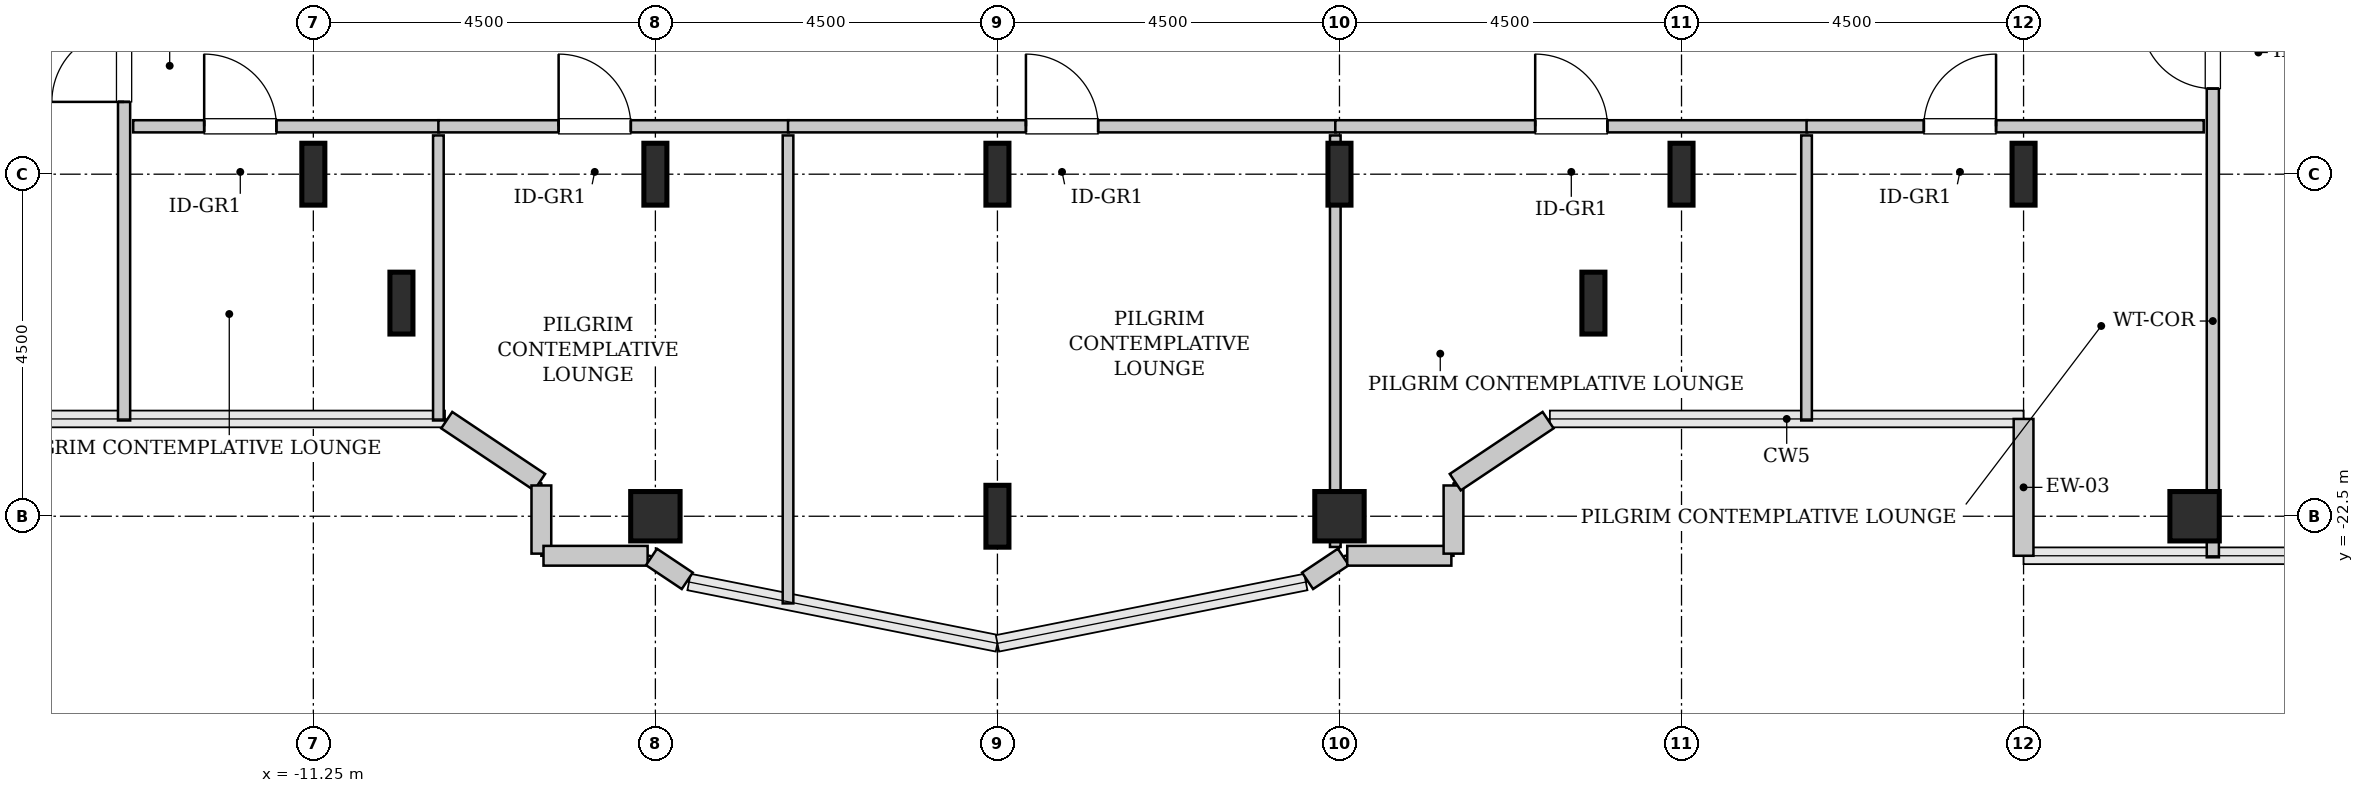
"""IFC4 building model, lengths in metres.
Left out: names, types, materials, properties, quantities, classifications, styles, units other than length and angle.
Written with IfcOpenShell. Run it as: python <this file> out.ifc"""

import sys

from ifc_helpers import new_model, si_unit, direction, frame, frame_2d, origin, origin_2d, place, context, subcontext, project, spatial, rectangle, hollow_rectangle, i_section, extrude, source, transform, mapped, element, fill, save


model = new_model("IFC4")
c1 = context("Model", 3, precision=1e-05, world=origin(), true_north=direction((0.0, 1.0)))
c2 = subcontext(c1, "Body", "Model", "MODEL_VIEW")
j1 = project(units=[si_unit("LENGTHUNIT", "METRE"), si_unit("PLANEANGLEUNIT", "RADIAN")], contexts=[c1])
p1 = place(None, origin())
s1 = spatial("IfcSite", under=j1, at=p1, CompositionType="ELEMENT")
p2 = place(p1, origin())
s2 = spatial("IfcBuilding", under=s1, at=p2, CompositionType="ELEMENT")
p3 = place(p2, frame((0.0, 0.0, 237.0)))
s3 = spatial("IfcBuildingStorey", under=s2, at=p3, CompositionType="ELEMENT", Elevation=237.0)
m1 = source(origin(), c2, "Body", "SweptSolid", [
    extrude(i_section(OverallWidth=0.303, OverallDepth=0.814, WebThickness=0.021, FlangeThickness=0.04, FilletRadius=0.03, at=origin_2d()), origin(), (0.0, 0.0, 1.0), 3.8),
])
for number, where, z_axis, x_axis in (
    (1, (-11.25, -18.0, 0.0), (0.0, 0.0, 1.0), (1.0, 0.0, 0.0)),
    (2, (-10.091, -19.696, 0.0), (0.0, 0.0, 1.0), (1.0, 0.0, 0.0)),
):
    element("IfcColumn", number, at=place(p3, frame(where, z_axis=z_axis, x_axis=x_axis)), inside=s3, PredefinedType="COLUMN", context=c2, shape_type="MappedRepresentation", body=[
        mapped(m1, transform((0.0, 0.0, 0.0), x_axis=(1.0, 0.0, 0.0), y_axis=(0.0, 1.0, 0.0), z_axis=(0.0, 0.0, 1.0), scale=1.0)),
    ])
m2 = source(origin(), c2, "Body", "SweptSolid", [
    extrude(hollow_rectangle(XDim=0.65, YDim=0.65, WallThickness=0.032, InnerFilletRadius=0.032, OuterFilletRadius=0.064, at=origin_2d()), origin(), (0.0, 0.0, 1.0), 3.8),
])
p4 = place(p3, frame((-6.75, -22.5, 0.0), z_axis=(0.0, 0.0, 1.0), x_axis=(1.0, 0.0, 0.0)))
e3 = element("IfcColumn", 3, at=p4, inside=s3, PredefinedType="COLUMN", context=c2, shape_type="MappedRepresentation", body=[
    mapped(m2, transform((0.0, 0.0, 0.0), x_axis=(1.0, 0.0, 0.0), y_axis=(0.0, 1.0, 0.0), z_axis=(0.0, 0.0, 1.0), scale=1.0)),
])
for number, where, z_axis, x_axis in (
    (4, (-6.75, -18.0, 0.0), (0.0, 0.0, 1.0), (1.0, 0.0, 0.0)),
    (5, (-2.25, -22.5, 0.0), (0.0, 0.0, 1.0), (1.0, 0.0, 0.0)),
    (6, (-2.25, -18.0, 0.0), (0.0, 0.0, 1.0), (1.0, 0.0, 0.0)),
):
    element("IfcColumn", number, at=place(p3, frame(where, z_axis=z_axis, x_axis=x_axis)), inside=s3, PredefinedType="COLUMN", context=c2, shape_type="MappedRepresentation", body=[
        mapped(m1, transform((0.0, 0.0, 0.0), x_axis=(1.0, 0.0, 0.0), y_axis=(0.0, 1.0, 0.0), z_axis=(0.0, 0.0, 1.0), scale=1.0)),
    ])
p5 = place(p3, frame((2.25, -22.5, 0.0), z_axis=(0.0, 0.0, 1.0), x_axis=(1.0, 0.0, 0.0)))
e7 = element("IfcColumn", 7, at=p5, inside=s3, PredefinedType="COLUMN", context=c2, shape_type="MappedRepresentation", body=[
    mapped(m2, transform((0.0, 0.0, 0.0), x_axis=(1.0, 0.0, 0.0), y_axis=(0.0, 1.0, 0.0), z_axis=(0.0, 0.0, 1.0), scale=1.0)),
])
for number, where, z_axis, x_axis in (
    (8, (2.25, -18.0, 0.0), (0.0, 0.0, 1.0), (1.0, 0.0, 0.0)),
    (9, (5.591, -19.696, 0.0), (0.0, 0.0, 1.0), (1.0, 0.0, 0.0)),
    (10, (6.75, -18.0, 0.0), (0.0, 0.0, 1.0), (1.0, 0.0, 0.0)),
    (11, (11.25, -18.0, 0.0), (0.0, 0.0, 1.0), (1.0, 0.0, 0.0)),
):
    element("IfcColumn", number, at=place(p3, frame(where, z_axis=z_axis, x_axis=x_axis)), inside=s3, PredefinedType="COLUMN", context=c2, shape_type="MappedRepresentation", body=[
        mapped(m1, transform((0.0, 0.0, 0.0), x_axis=(1.0, 0.0, 0.0), y_axis=(0.0, 1.0, 0.0), z_axis=(0.0, 0.0, 1.0), scale=1.0)),
    ])
p6 = place(p3, frame((13.5, -22.5, 0.0), z_axis=(0.0, 0.0, 1.0), x_axis=(1.0, 0.0, 0.0)))
e12 = element("IfcColumn", 12, at=p6, inside=s3, PredefinedType="COLUMN", context=c2, shape_type="MappedRepresentation", body=[
    mapped(m2, transform((0.0, 0.0, 0.0), x_axis=(1.0, 0.0, 0.0), y_axis=(0.0, 1.0, 0.0), z_axis=(0.0, 0.0, 1.0), scale=1.0)),
])
m3 = source(origin(), c2, "Body", "SweptSolid", [
    extrude(rectangle(XDim=1.8, YDim=0.26, at=frame_2d((0.9, 0.0))), origin(), (0.0, 0.0, 1.0), 3.55),
])
p7 = place(p3, frame((11.25, -21.22, 0.0), z_axis=(0.0, 0.0, 1.0), x_axis=(0.0, -1.0, 0.0)))
e13 = element("IfcWall", 13, at=p7, inside=s3, PredefinedType="SOLIDWALL", context=c2, shape_type="MappedRepresentation", body=[
    mapped(m3, transform((0.0, 0.0, 0.0), x_axis=(1.0, 0.0, 0.0), y_axis=(0.0, 1.0, 0.0), z_axis=(0.0, 0.0, 1.0), scale=1.0)),
])
m4 = source(origin(), c2, "Body", "SweptSolid", [
    extrude(rectangle(XDim=1.469, YDim=0.26, at=frame_2d((0.734, 0.0))), origin(), (0.0, 0.0, 1.0), 3.55),
])
p8 = place(p3, frame((-9.495, -21.236, 0.0), z_axis=(0.0, 0.0, 1.0), x_axis=(0.831461760506, -0.555581983884, 0.0)))
e14 = element("IfcWall", 14, at=p8, inside=s3, PredefinedType="SOLIDWALL", context=c2, shape_type="MappedRepresentation", body=[
    mapped(m4, transform((0.0, 0.0, 0.0), x_axis=(1.0, 0.0, 0.0), y_axis=(0.0, 1.0, 0.0), z_axis=(0.0, 0.0, 1.0), scale=1.0)),
])
m5 = source(origin(), c2, "Body", "SweptSolid", [
    extrude(rectangle(XDim=0.897, YDim=0.26, at=frame_2d((0.448, 0.0))), origin(), (0.0, 0.0, 1.0), 3.55),
])
p9 = place(p3, frame((-8.25, -22.095, 0.0), z_axis=(0.0, 0.0, 1.0), x_axis=(0.0, -1.0, 0.0)))
e15 = element("IfcWall", 15, at=p9, inside=s3, PredefinedType="SOLIDWALL", context=c2, shape_type="MappedRepresentation", body=[
    mapped(m5, transform((0.0, 0.0, 0.0), x_axis=(1.0, 0.0, 0.0), y_axis=(0.0, 1.0, 0.0), z_axis=(0.0, 0.0, 1.0), scale=1.0)),
])
m6 = source(origin(), c2, "Body", "SweptSolid", [
    extrude(rectangle(XDim=1.37, YDim=0.26, at=frame_2d((0.685, 0.0))), origin(), (0.0, 0.0, 1.0), 3.55),
])
p10 = place(p3, frame((-8.222, -23.02, 0.0), z_axis=(0.0, 0.0, 1.0), x_axis=(1.0, 0.0, 0.0)))
e16 = element("IfcWall", 16, at=p10, inside=s3, PredefinedType="SOLIDWALL", context=c2, shape_type="MappedRepresentation", body=[
    mapped(m6, transform((0.0, 0.0, 0.0), x_axis=(1.0, 0.0, 0.0), y_axis=(0.0, 1.0, 0.0), z_axis=(0.0, 0.0, 1.0), scale=1.0)),
])
m7 = source(origin(), c2, "Body", "SweptSolid", [
    extrude(rectangle(XDim=0.565, YDim=0.26, at=frame_2d((0.283, 0.0))), origin(), (0.0, 0.0, 1.0), 3.55),
])
for number, where, z_axis, x_axis in (
    (17, (-6.801, -23.036, 0.0), (0.0, 0.0, 1.0), (0.832, -0.555, 0.0)),
    (18, (1.831, -23.35, 0.0), (0.0, 0.0, 1.0), (0.832, 0.555, 0.0)),
):
    element("IfcWall", number, at=place(p3, frame(where, z_axis=z_axis, x_axis=x_axis)), inside=s3, PredefinedType="SOLIDWALL", context=c2, shape_type="MappedRepresentation", body=[
        mapped(m7, transform((0.0, 0.0, 0.0), x_axis=(1.0, 0.0, 0.0), y_axis=(0.0, 1.0, 0.0), z_axis=(0.0, 0.0, 1.0), scale=1.0)),
    ])
p11 = place(p3, frame((2.352, -23.02, 0.0), z_axis=(0.0, 0.0, 1.0), x_axis=(1.0, 0.0, 0.0)))
e19 = element("IfcWall", 19, at=p11, inside=s3, PredefinedType="SOLIDWALL", context=c2, shape_type="MappedRepresentation", body=[
    mapped(m6, transform((0.0, 0.0, 0.0), x_axis=(1.0, 0.0, 0.0), y_axis=(0.0, 1.0, 0.0), z_axis=(0.0, 0.0, 1.0), scale=1.0)),
])
p12 = place(p3, frame((3.75, -22.992, 0.0), z_axis=(0.0, 0.0, 1.0), x_axis=(0.0, 1.0, 0.0)))
e20 = element("IfcWall", 20, at=p12, inside=s3, PredefinedType="SOLIDWALL", context=c2, shape_type="MappedRepresentation", body=[
    mapped(m5, transform((0.0, 0.0, 0.0), x_axis=(1.0, 0.0, 0.0), y_axis=(0.0, 1.0, 0.0), z_axis=(0.0, 0.0, 1.0), scale=1.0)),
])
p13 = place(p3, frame((3.773, -22.052, 0.0), z_axis=(0.0, 0.0, 1.0), x_axis=(0.831461760506, 0.555581983884, 0.0)))
e21 = element("IfcWall", 21, at=p13, inside=s3, PredefinedType="SOLIDWALL", context=c2, shape_type="MappedRepresentation", body=[
    mapped(m4, transform((0.0, 0.0, 0.0), x_axis=(1.0, 0.0, 0.0), y_axis=(0.0, 1.0, 0.0), z_axis=(0.0, 0.0, 1.0), scale=1.0)),
])
m8 = source(origin(), c2, "Body", "SweptSolid", [
    extrude(rectangle(XDim=5.502, YDim=0.16, at=frame_2d((2.751, 0.0))), origin(), (0.0, 0.0, 1.0), 3.535),
])
p14 = place(p3, frame((-13.74, -21.24, 0.0), z_axis=(0.0, 0.0, 1.0), x_axis=(0.0, 1.0, 0.0)))
e22 = element("IfcWall", 22, at=p14, inside=s3, PredefinedType="PARTITIONING", context=c2, shape_type="MappedRepresentation", body=[
    mapped(m8, transform((0.0, 0.0, 0.0), x_axis=(1.0, 0.0, 0.0), y_axis=(0.0, 1.0, 0.0), z_axis=(0.0, 0.0, 1.0), scale=1.0)),
])
p15 = place(p14, frame((4.191, 0.0, 0.0)))
e23 = element("IfcOpeningElement", 23, at=p15, cuts=e22, PredefinedType="OPENING", context=c2, shape_type="SweptSolid", body=[
    extrude(rectangle(XDim=0.95, YDim=2.1, at=frame_2d((0.475, 1.05))), frame((0.0, 0.09, 0.0), z_axis=(0.0, -1.0, 0.0), x_axis=(1.0, 0.0, 0.0)), (0.0, 0.0, 1.0), 0.18),
])
m9 = source(origin(), c2, "Body", "SweptSolid", [
    extrude(rectangle(XDim=7.653, YDim=0.16, at=frame_2d((3.826, 0.0))), origin(), (0.0, 0.0, 1.0), 3.535),
])
p16 = place(p3, frame((13.74, -23.04, 0.0), z_axis=(0.0, 0.0, 1.0), x_axis=(0.0, 1.0, 0.0)))
e24 = element("IfcWall", 24, at=p16, inside=s3, PredefinedType="PARTITIONING", context=c2, shape_type="MappedRepresentation", body=[
    mapped(m9, transform((0.0, 0.0, 0.0), x_axis=(1.0, 0.0, 0.0), y_axis=(0.0, 1.0, 0.0), z_axis=(0.0, 0.0, 1.0), scale=1.0)),
])
p17 = place(p16, frame((6.166, 0.0, 0.0)))
e25 = element("IfcOpeningElement", 25, at=p17, cuts=e24, PredefinedType="OPENING", context=c2, shape_type="SweptSolid", body=[
    extrude(rectangle(XDim=0.95, YDim=2.1, at=frame_2d((0.475, 1.05))), frame((0.0, 0.09, 0.0), z_axis=(0.0, -1.0, 0.0), x_axis=(1.0, 0.0, 0.0)), (0.0, 0.0, 1.0), 0.18),
])
m10 = source(origin(), c2, "Body", "SweptSolid", [
    extrude(rectangle(XDim=4.025, YDim=0.16, at=frame_2d((2.013, 0.0))), origin(), (0.0, 0.0, 1.0), 3.535),
])
p18 = place(p3, frame((-13.62, -17.37, 0.0), z_axis=(0.0, 0.0, 1.0), x_axis=(1.0, 0.0, 0.0)))
e26 = element("IfcWall", 26, at=p18, inside=s3, PredefinedType="PARTITIONING", context=c2, shape_type="MappedRepresentation", body=[
    mapped(m10, transform((0.0, 0.0, 0.0), x_axis=(1.0, 0.0, 0.0), y_axis=(0.0, 1.0, 0.0), z_axis=(0.0, 0.0, 1.0), scale=1.0)),
])
p19 = place(p18, frame((0.934, 0.0, 0.0)))
e27 = element("IfcOpeningElement", 27, at=p19, cuts=e26, PredefinedType="OPENING", context=c2, shape_type="SweptSolid", body=[
    extrude(rectangle(XDim=0.95, YDim=2.1, at=frame_2d((0.475, 1.05))), frame((0.0, 0.09, 0.0), z_axis=(0.0, -1.0, 0.0), x_axis=(1.0, 0.0, 0.0)), (0.0, 0.0, 1.0), 0.18),
])
m11 = source(origin(), c2, "Body", "SweptSolid", [
    extrude(rectangle(XDim=3.75, YDim=0.14, at=frame_2d((1.875, 0.0))), origin(), (0.0, 0.0, 1.0), 3.535),
])
p20 = place(p3, frame((-9.605, -21.24, 0.0), z_axis=(0.0, 0.0, 1.0), x_axis=(0.0, 1.0, 0.0)))
e28 = element("IfcWall", 28, at=p20, inside=s3, PredefinedType="PARTITIONING", context=c2, shape_type="MappedRepresentation", body=[
    mapped(m11, transform((0.0, 0.0, 0.0), x_axis=(1.0, 0.0, 0.0), y_axis=(0.0, 1.0, 0.0), z_axis=(0.0, 0.0, 1.0), scale=1.0)),
])
m12 = source(origin(), c2, "Body", "SweptSolid", [
    extrude(rectangle(XDim=4.61, YDim=0.16, at=frame_2d((2.305, 0.0))), origin(), (0.0, 0.0, 1.0), 3.535),
])
p21 = place(p3, frame((-9.605, -17.37, 0.0), z_axis=(0.0, 0.0, 1.0), x_axis=(1.0, 0.0, 0.0)))
e29 = element("IfcWall", 29, at=p21, inside=s3, PredefinedType="PARTITIONING", context=c2, shape_type="MappedRepresentation", body=[
    mapped(m12, transform((0.0, 0.0, 0.0), x_axis=(1.0, 0.0, 0.0), y_axis=(0.0, 1.0, 0.0), z_axis=(0.0, 0.0, 1.0), scale=1.0)),
])
p22 = place(p21, frame((1.582, 0.0, 0.0)))
e30 = element("IfcOpeningElement", 30, at=p22, cuts=e29, PredefinedType="OPENING", context=c2, shape_type="SweptSolid", body=[
    extrude(rectangle(XDim=0.95, YDim=2.1, at=frame_2d((0.475, 1.05))), frame((0.0, 0.09, 0.0), z_axis=(0.0, -1.0, 0.0), x_axis=(1.0, 0.0, 0.0)), (0.0, 0.0, 1.0), 0.18),
])
m13 = source(origin(), c2, "Body", "SweptSolid", [
    extrude(rectangle(XDim=6.157, YDim=0.14, at=frame_2d((3.078, 0.0))), origin(), (0.0, 0.0, 1.0), 3.535),
])
p23 = place(p3, frame((-5.005, -23.647, 0.0), z_axis=(0.0, 0.0, 1.0), x_axis=(0.0, 1.0, 0.0)))
e31 = element("IfcWall", 31, at=p23, inside=s3, PredefinedType="PARTITIONING", context=c2, shape_type="MappedRepresentation", body=[
    mapped(m13, transform((0.0, 0.0, 0.0), x_axis=(1.0, 0.0, 0.0), y_axis=(0.0, 1.0, 0.0), z_axis=(0.0, 0.0, 1.0), scale=1.0)),
])
m14 = source(origin(), c2, "Body", "SweptSolid", [
    extrude(rectangle(XDim=7.21, YDim=0.16, at=frame_2d((3.605, 0.0))), origin(), (0.0, 0.0, 1.0), 3.535),
])
p24 = place(p3, frame((-5.005, -17.37, 0.0), z_axis=(0.0, 0.0, 1.0), x_axis=(1.0, 0.0, 0.0)))
e32 = element("IfcWall", 32, at=p24, inside=s3, PredefinedType="PARTITIONING", context=c2, shape_type="MappedRepresentation", body=[
    mapped(m14, transform((0.0, 0.0, 0.0), x_axis=(1.0, 0.0, 0.0), y_axis=(0.0, 1.0, 0.0), z_axis=(0.0, 0.0, 1.0), scale=1.0)),
])
p25 = place(p24, frame((3.13, 0.0, 0.0)))
e33 = element("IfcOpeningElement", 33, at=p25, cuts=e32, PredefinedType="OPENING", context=c2, shape_type="SweptSolid", body=[
    extrude(rectangle(XDim=0.95, YDim=2.1, at=frame_2d((0.475, 1.05))), frame((0.0, 0.09, 0.0), z_axis=(0.0, -1.0, 0.0), x_axis=(1.0, 0.0, 0.0)), (0.0, 0.0, 1.0), 0.18),
])
m15 = source(origin(), c2, "Body", "SweptSolid", [
    extrude(rectangle(XDim=5.414, YDim=0.14, at=frame_2d((2.707, 0.0))), origin(), (0.0, 0.0, 1.0), 2.925),
])
p26 = place(p3, frame((2.195, -22.904, 0.0), z_axis=(0.0, 0.0, 1.0), x_axis=(0.0, 1.0, 0.0)))
e34 = element("IfcWall", 34, at=p26, inside=s3, PredefinedType="PARTITIONING", context=c2, shape_type="MappedRepresentation", body=[
    mapped(m15, transform((0.0, 0.0, 0.0), x_axis=(1.0, 0.0, 0.0), y_axis=(0.0, 1.0, 0.0), z_axis=(0.0, 0.0, 1.0), scale=1.0)),
])
m16 = source(origin(), c2, "Body", "SweptSolid", [
    extrude(rectangle(XDim=6.21, YDim=0.16, at=frame_2d((3.105, 0.0))), origin(), (0.0, 0.0, 1.0), 3.535),
])
p27 = place(p3, frame((2.195, -17.37, 0.0), z_axis=(0.0, 0.0, 1.0), x_axis=(1.0, 0.0, 0.0)))
e35 = element("IfcWall", 35, at=p27, inside=s3, PredefinedType="PARTITIONING", context=c2, shape_type="MappedRepresentation", body=[
    mapped(m16, transform((0.0, 0.0, 0.0), x_axis=(1.0, 0.0, 0.0), y_axis=(0.0, 1.0, 0.0), z_axis=(0.0, 0.0, 1.0), scale=1.0)),
])
p28 = place(p27, frame((2.63, 0.0, 0.0)))
e36 = element("IfcOpeningElement", 36, at=p28, cuts=e35, PredefinedType="OPENING", context=c2, shape_type="SweptSolid", body=[
    extrude(rectangle(XDim=0.95, YDim=2.1, at=frame_2d((0.475, 1.05))), frame((0.0, 0.09, 0.0), z_axis=(0.0, -1.0, 0.0), x_axis=(1.0, 0.0, 0.0)), (0.0, 0.0, 1.0), 0.18),
])
p29 = place(p3, frame((8.395, -21.24, 0.0), z_axis=(0.0, 0.0, 1.0), x_axis=(0.0, 1.0, 0.0)))
e37 = element("IfcWall", 37, at=p29, inside=s3, PredefinedType="PARTITIONING", context=c2, shape_type="MappedRepresentation", body=[
    mapped(m11, transform((0.0, 0.0, 0.0), x_axis=(1.0, 0.0, 0.0), y_axis=(0.0, 1.0, 0.0), z_axis=(0.0, 0.0, 1.0), scale=1.0)),
])
m17 = source(origin(), c2, "Body", "SweptSolid", [
    extrude(rectangle(XDim=5.225, YDim=0.16, at=frame_2d((2.613, 0.0))), origin(), (0.0, 0.0, 1.0), 3.535),
])
p30 = place(p3, frame((8.395, -17.37, 0.0), z_axis=(0.0, 0.0, 1.0), x_axis=(1.0, 0.0, 0.0)))
e38 = element("IfcWall", 38, at=p30, inside=s3, PredefinedType="PARTITIONING", context=c2, shape_type="MappedRepresentation", body=[
    mapped(m17, transform((0.0, 0.0, 0.0), x_axis=(1.0, 0.0, 0.0), y_axis=(0.0, 1.0, 0.0), z_axis=(0.0, 0.0, 1.0), scale=1.0)),
])
p31 = place(p30, frame((1.543, 0.0, 0.0)))
e39 = element("IfcOpeningElement", 39, at=p31, cuts=e38, PredefinedType="OPENING", context=c2, shape_type="SweptSolid", body=[
    extrude(rectangle(XDim=0.95, YDim=2.1, at=frame_2d((0.475, 1.05))), frame((0.0, 0.09, 0.0), z_axis=(0.0, -1.0, 0.0), x_axis=(1.0, 0.0, 0.0)), (0.0, 0.0, 1.0), 0.18),
])
m18 = source(origin(), c2, "Body", "SweptSolid", [
    extrude(rectangle(XDim=0.95, YDim=2.1, at=frame_2d((0.475, 1.05))), frame((0.0, 0.025, 0.0), z_axis=(0.0, -1.0, 0.0), x_axis=(1.0, 0.0, 0.0)), (0.0, 0.0, 1.0), 0.05),
])
p32 = place(p15, origin())
e40 = element("IfcDoor", 40, at=p32, inside=s3, OperationType="SINGLE_SWING_LEFT", PredefinedType="DOOR", context=c2, shape_type="MappedRepresentation", body=[
    mapped(m18, transform((0.0, 0.0, 0.0), x_axis=(1.0, 0.0, 0.0), y_axis=(0.0, 1.0, 0.0), z_axis=(0.0, 0.0, 1.0), scale=1.0)),
])
fill(e23, e40)
p33 = place(p17, origin())
e41 = element("IfcDoor", 41, at=p33, inside=s3, OperationType="SINGLE_SWING_RIGHT", PredefinedType="DOOR", context=c2, shape_type="MappedRepresentation", body=[
    mapped(m18, transform((0.0, 0.0, 0.0), x_axis=(1.0, 0.0, 0.0), y_axis=(0.0, 1.0, 0.0), z_axis=(0.0, 0.0, 1.0), scale=1.0)),
])
fill(e25, e41)
p34 = place(p19, origin())
e42 = element("IfcDoor", 42, at=p34, inside=s3, OperationType="SINGLE_SWING_LEFT", PredefinedType="DOOR", context=c2, shape_type="MappedRepresentation", body=[
    mapped(m18, transform((0.0, 0.0, 0.0), x_axis=(1.0, 0.0, 0.0), y_axis=(0.0, 1.0, 0.0), z_axis=(0.0, 0.0, 1.0), scale=1.0)),
])
fill(e27, e42)
p35 = place(p22, origin())
e43 = element("IfcDoor", 43, at=p35, inside=s3, OperationType="SINGLE_SWING_LEFT", PredefinedType="DOOR", context=c2, shape_type="MappedRepresentation", body=[
    mapped(m18, transform((0.0, 0.0, 0.0), x_axis=(1.0, 0.0, 0.0), y_axis=(0.0, 1.0, 0.0), z_axis=(0.0, 0.0, 1.0), scale=1.0)),
])
fill(e30, e43)
p36 = place(p25, origin())
e44 = element("IfcDoor", 44, at=p36, inside=s3, OperationType="SINGLE_SWING_LEFT", PredefinedType="DOOR", context=c2, shape_type="MappedRepresentation", body=[
    mapped(m18, transform((0.0, 0.0, 0.0), x_axis=(1.0, 0.0, 0.0), y_axis=(0.0, 1.0, 0.0), z_axis=(0.0, 0.0, 1.0), scale=1.0)),
])
fill(e33, e44)
p37 = place(p28, origin())
e45 = element("IfcDoor", 45, at=p37, inside=s3, OperationType="SINGLE_SWING_LEFT", PredefinedType="DOOR", context=c2, shape_type="MappedRepresentation", body=[
    mapped(m18, transform((0.0, 0.0, 0.0), x_axis=(1.0, 0.0, 0.0), y_axis=(0.0, 1.0, 0.0), z_axis=(0.0, 0.0, 1.0), scale=1.0)),
])
fill(e36, e45)
p38 = place(p31, origin())
e46 = element("IfcDoor", 46, at=p38, inside=s3, OperationType="SINGLE_SWING_RIGHT", PredefinedType="DOOR", context=c2, shape_type="MappedRepresentation", body=[
    mapped(m18, transform((0.0, 0.0, 0.0), x_axis=(1.0, 0.0, 0.0), y_axis=(0.0, 1.0, 0.0), z_axis=(0.0, 0.0, 1.0), scale=1.0)),
])
fill(e39, e46)
save(model, sys.argv[1])
